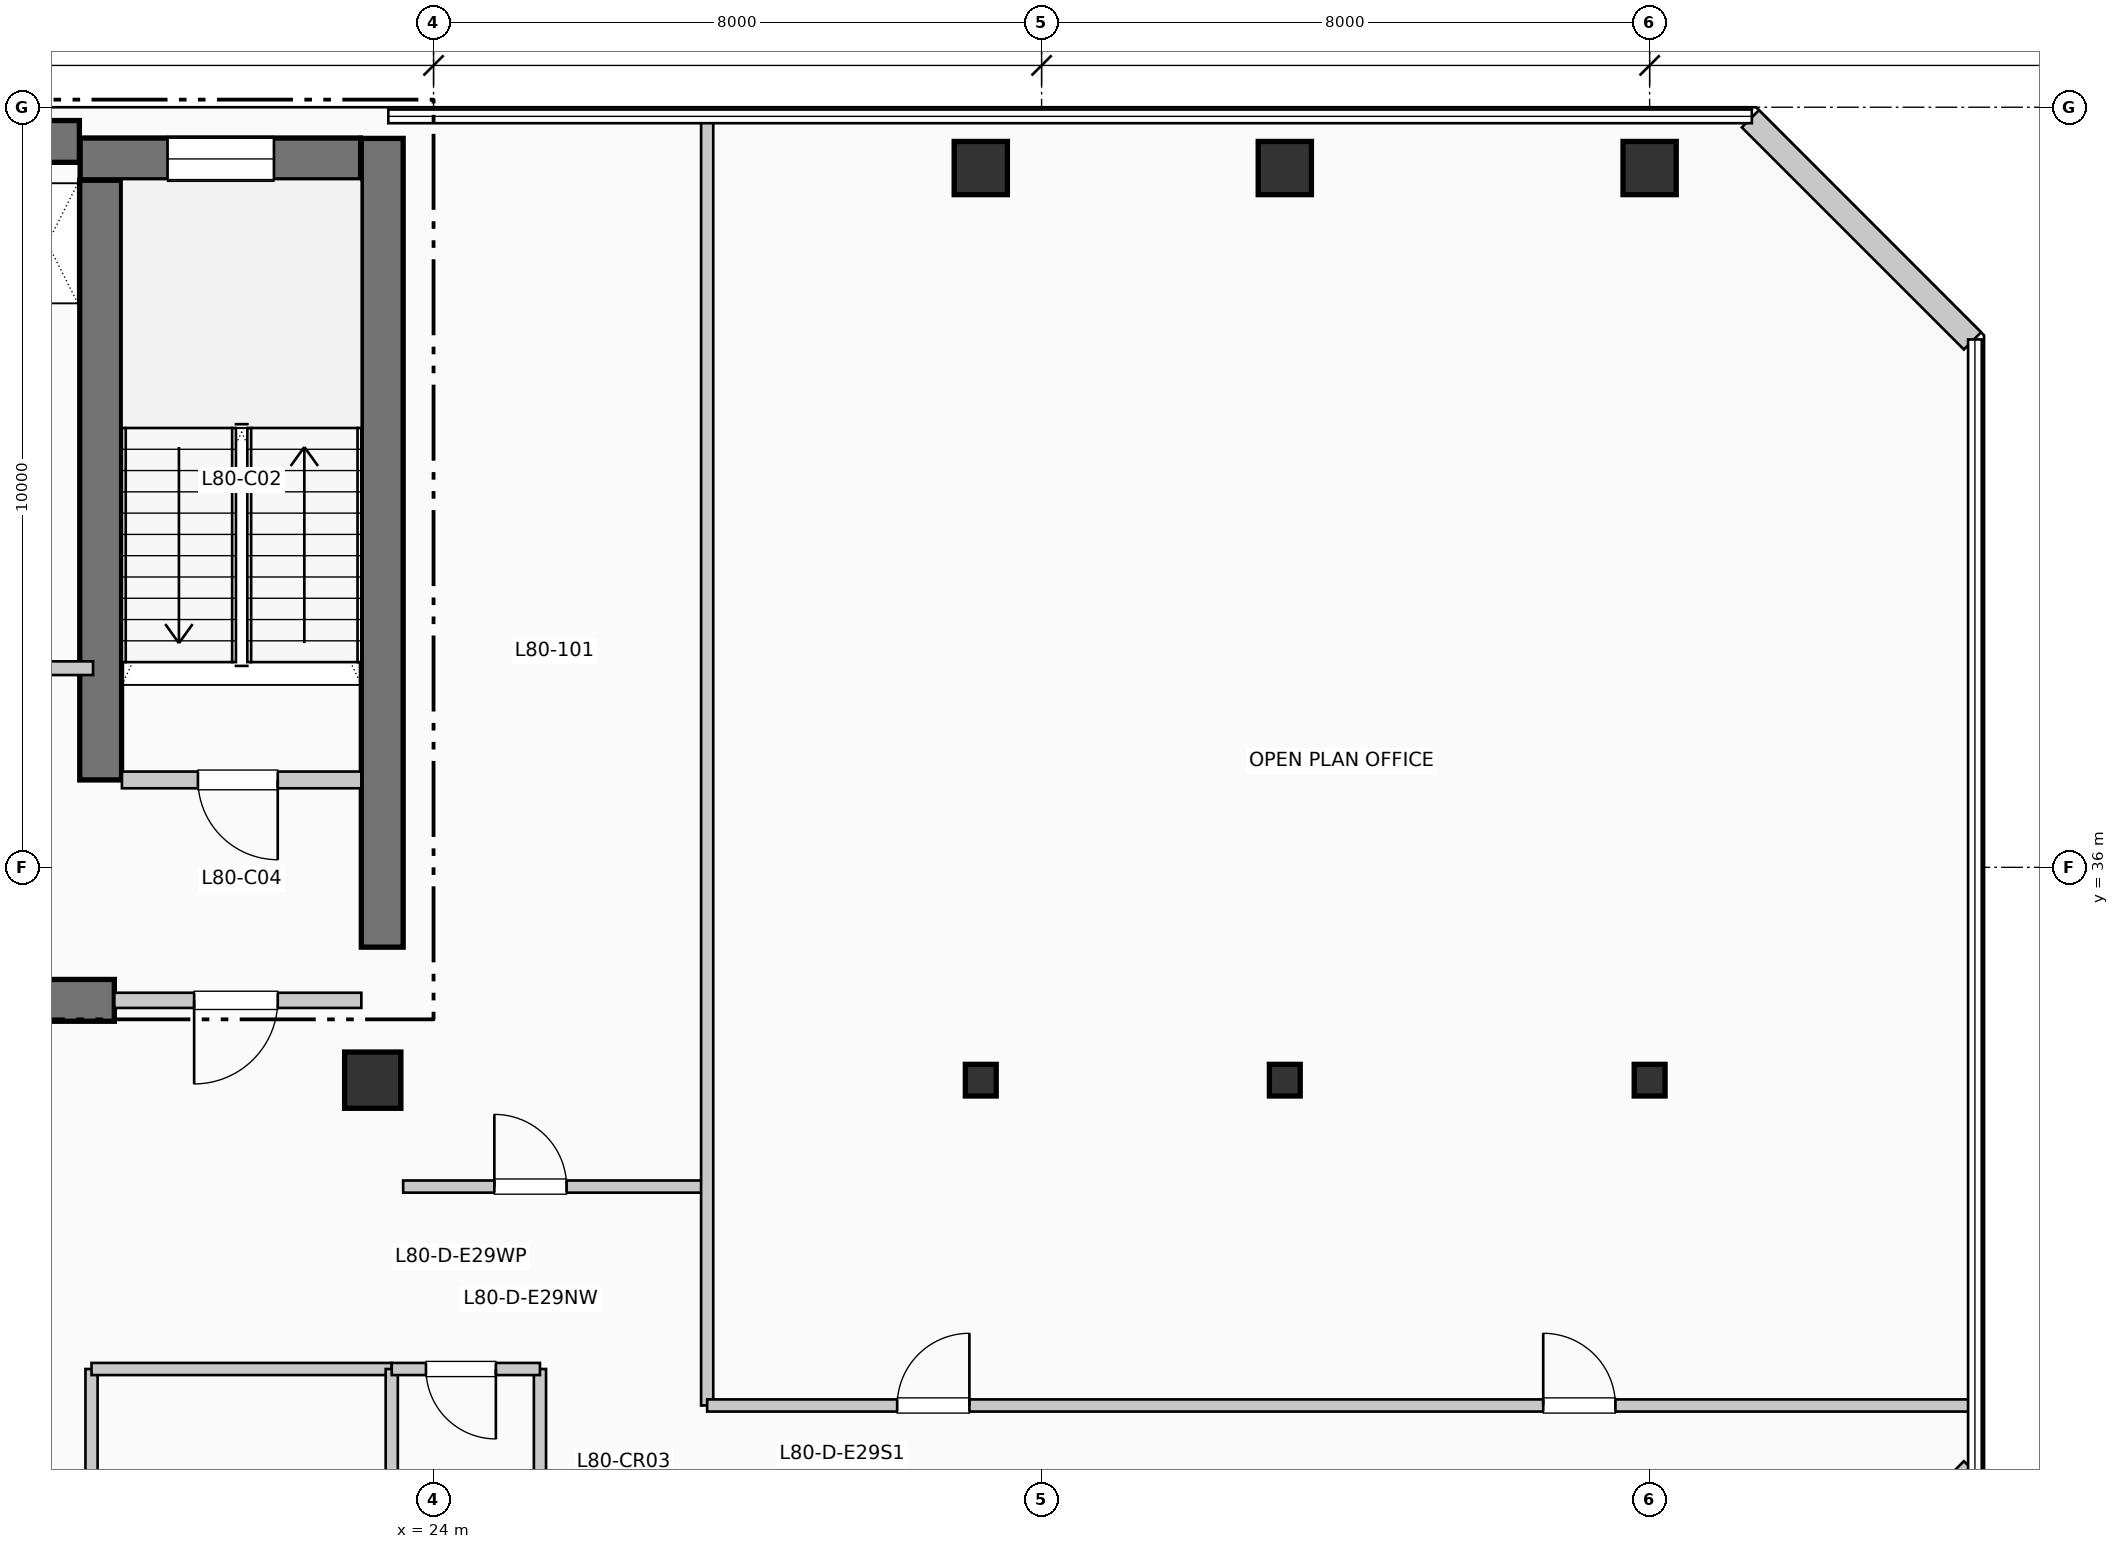
"""IFC4 building model, lengths in metres.
Left out: names, types, materials, properties, quantities, classifications, styles, units other than length and angle.
Written with IfcOpenShell. Run it as: python <this file> out.ifc"""

import sys

from ifc_helpers import new_model, si_unit, direction, frame, frame_2d, origin, origin_2d, place, context, subcontext, project, spatial, rectangle, i_section, extrude, element, fill, save


model = new_model("IFC4")
c1 = context("Model", 3, precision=1e-05, world=origin(), true_north=direction((0.0, 1.0)))
c2 = subcontext(c1, "Body", "Model", "MODEL_VIEW")
j1 = project(units=[si_unit("LENGTHUNIT", "METRE"), si_unit("PLANEANGLEUNIT", "RADIAN")], contexts=[c1])
p1 = place(None, origin())
s1 = spatial("IfcSite", under=j1, at=p1, CompositionType="ELEMENT")
p2 = place(p1, origin())
s2 = spatial("IfcBuilding", under=s1, at=p2, CompositionType="ELEMENT")
p3 = place(p2, frame((0.0, 0.0, 327.69)))
s3 = spatial("IfcBuildingStorey", under=s2, at=p3, CompositionType="ELEMENT", Elevation=327.69)
p4 = place(p3, frame((5.36, 45.55, 0.0), z_axis=(0.0, 0.0, 1.0), x_axis=(1.0, 0.0, 0.0)))
e1 = element("IfcWall", 1, at=p4, inside=s3, PredefinedType="SHEAR", context=c2, shape_type="SweptSolid", body=[
    extrude(rectangle(XDim=13.98, YDim=0.55, at=frame_2d((6.99, 0.0))), origin(), (0.0, 0.0, 1.0), 3.96),
])
p5 = place(p3, frame((23.325, 34.95, 0.0), z_axis=(0.0, 0.0, 1.0), x_axis=(0.0, 1.0, 0.0)))
e2 = element("IfcWall", 2, at=p5, inside=s3, PredefinedType="SHEAR", context=c2, shape_type="SweptSolid", body=[
    extrude(rectangle(XDim=10.64, YDim=0.55, at=frame_2d((5.32, 0.0))), origin(), (0.0, 0.0, 1.0), 3.96),
])
p6 = place(p3, frame((13.68, 34.25, 0.0), z_axis=(0.0, 0.0, 1.0), x_axis=(1.0, 0.0, 0.0)))
e3 = element("IfcWall", 3, at=p6, inside=s3, PredefinedType="SHEAR", context=c2, shape_type="SweptSolid", body=[
    extrude(rectangle(XDim=6.12, YDim=0.55, at=frame_2d((3.06, 0.0))), origin(), (0.0, 0.0, 1.0), 3.96),
])
p7 = place(p3, frame((19.62, 37.15, 0.0), z_axis=(0.0, 0.0, 1.0), x_axis=(0.0, 1.0, 0.0)))
e4 = element("IfcWall", 4, at=p7, inside=s3, PredefinedType="SHEAR", context=c2, shape_type="SweptSolid", body=[
    extrude(rectangle(XDim=7.89, YDim=0.55, at=frame_2d((3.945, 0.0))), origin(), (0.0, 0.0, 1.0), 3.96),
])
p8 = place(p3, frame((19.35, 45.32, 0.0), z_axis=(0.0, 0.0, 1.0), x_axis=(1.0, 0.0, 0.0)))
e5 = element("IfcWall", 5, at=p8, inside=s3, PredefinedType="SHEAR", context=c2, shape_type="SweptSolid", body=[
    extrude(rectangle(XDim=3.69, YDim=0.55, at=frame_2d((1.845, 0.0))), origin(), (0.0, 0.0, 1.0), 3.96),
])
p9 = place(p8, frame((1.15, 0.0, 1.05)))
e6 = element("IfcOpeningElement", 6, at=p9, cuts=e5, PredefinedType="OPENING", context=c2, shape_type="SweptSolid", body=[
    extrude(rectangle(XDim=1.4, YDim=1.8, at=frame_2d((0.7, 0.9))), frame((0.0, 0.285, 0.0), z_axis=(0.0, -1.0, 0.0), x_axis=(1.0, 0.0, 0.0)), (0.0, 0.0, 1.0), 0.57),
])
p10 = place(p3, frame((23.2, 33.2, 0.0), z_axis=(0.0, 0.0, 1.0), x_axis=(1.0, 0.0, 0.0)))
e7 = element("IfcColumn", 7, at=p10, inside=s3, PredefinedType="COLUMN", context=c2, shape_type="SweptSolid", body=[
    extrude(rectangle(XDim=0.74, YDim=0.74, at=origin_2d()), origin(), (0.0, 0.0, 1.0), 3.96),
])
p11 = place(p3, frame((31.2, 33.2, 0.0), z_axis=(0.0, 0.0, 1.0), x_axis=(1.0, 0.0, 0.0)))
e8 = element("IfcColumn", 8, at=p11, inside=s3, PredefinedType="COLUMN", context=c2, shape_type="SweptSolid", body=[
    extrude(i_section(OverallWidth=0.406, OverallDepth=0.416, WebThickness=0.022, FlangeThickness=0.036, at=origin_2d()), origin(), (0.0, 0.0, 1.0), 3.96),
])
p12 = place(p3, frame((31.2, 45.2, 0.0), z_axis=(0.0, 0.0, 1.0), x_axis=(1.0, 0.0, 0.0)))
e9 = element("IfcColumn", 9, at=p12, inside=s3, PredefinedType="COLUMN", context=c2, shape_type="SweptSolid", body=[
    extrude(rectangle(XDim=0.7, YDim=0.7, at=origin_2d()), origin(), (0.0, 0.0, 1.0), 3.96),
])
p13 = place(p3, frame((35.2, 33.2, 0.0), z_axis=(0.0, 0.0, 1.0), x_axis=(1.0, 0.0, 0.0)))
e10 = element("IfcColumn", 10, at=p13, inside=s3, PredefinedType="COLUMN", context=c2, shape_type="SweptSolid", body=[
    extrude(i_section(OverallWidth=0.406, OverallDepth=0.416, WebThickness=0.022, FlangeThickness=0.036, at=origin_2d()), origin(), (0.0, 0.0, 1.0), 3.96),
])
p14 = place(p3, frame((35.2, 45.2, 0.0), z_axis=(0.0, 0.0, 1.0), x_axis=(1.0, 0.0, 0.0)))
e11 = element("IfcColumn", 11, at=p14, inside=s3, PredefinedType="COLUMN", context=c2, shape_type="SweptSolid", body=[
    extrude(rectangle(XDim=0.7, YDim=0.7, at=origin_2d()), origin(), (0.0, 0.0, 1.0), 3.96),
])
p15 = place(p3, frame((40.0, 33.2, 0.0), z_axis=(0.0, 0.0, 1.0), x_axis=(1.0, 0.0, 0.0)))
e12 = element("IfcColumn", 12, at=p15, inside=s3, PredefinedType="COLUMN", context=c2, shape_type="SweptSolid", body=[
    extrude(i_section(OverallWidth=0.406, OverallDepth=0.416, WebThickness=0.022, FlangeThickness=0.036, at=origin_2d()), origin(), (0.0, 0.0, 1.0), 3.96),
])
p16 = place(p3, frame((40.0, 45.2, 0.0), z_axis=(0.0, 0.0, 1.0), x_axis=(1.0, 0.0, 0.0)))
e13 = element("IfcColumn", 13, at=p16, inside=s3, PredefinedType="COLUMN", context=c2, shape_type="SweptSolid", body=[
    extrude(rectangle(XDim=0.7, YDim=0.7, at=origin_2d()), origin(), (0.0, 0.0, 1.0), 3.96),
])
for number, where, z_axis, x_axis in (
    (14, (41.326, 25.152, 0.0), (0.0, 0.0, 1.0), (0.707, 0.707, 0.0)),
    (15, (44.248, 42.926, 0.0), (0.0, 0.0, 1.0), (-0.707, 0.707, 0.0)),
):
    element("IfcWall", number, at=place(p3, frame(where, z_axis=z_axis, x_axis=x_axis)), inside=s3, PredefinedType="SOLIDWALL", context=c2, shape_type="SweptSolid", body=[
        extrude(rectangle(XDim=4.133, YDim=0.32, at=frame_2d((2.066, 0.0))), origin(), (0.0, 0.0, 1.0), 3.74),
    ])
p17 = place(p3, frame((19.9, 37.15, 0.0), z_axis=(0.0, 0.0, 1.0), x_axis=(1.0, 0.0, 0.0)))
e16 = element("IfcWall", 16, at=p17, inside=s3, PredefinedType="PARTITIONING", context=c2, shape_type="SweptSolid", body=[
    extrude(rectangle(XDim=3.15, YDim=0.22, at=frame_2d((1.575, 0.0))), origin(), (0.0, 0.0, 1.0), 3.74),
])
p18 = place(p17, frame((2.05, 0.0, 0.0), z_axis=(0.0, 0.0, 1.0), x_axis=(-1.0, 0.0, 0.0)))
e17 = element("IfcOpeningElement", 17, at=p18, cuts=e16, PredefinedType="OPENING", context=c2, shape_type="SweptSolid", body=[
    extrude(rectangle(XDim=1.05, YDim=2.15, at=frame_2d((0.525, 1.075))), frame((0.0, 0.12, 0.0), z_axis=(0.0, -1.0, 0.0), x_axis=(1.0, 0.0, 0.0)), (0.0, 0.0, 1.0), 0.24),
])
p19 = place(p3, frame((19.8, 34.25, 0.0), z_axis=(0.0, 0.0, 1.0), x_axis=(1.0, 0.0, 0.0)))
e18 = element("IfcWall", 18, at=p19, inside=s3, PredefinedType="PARTITIONING", context=c2, shape_type="SweptSolid", body=[
    extrude(rectangle(XDim=3.25, YDim=0.2, at=frame_2d((1.625, 0.0))), origin(), (0.0, 0.0, 1.0), 3.74),
])
p20 = place(p19, frame((2.15, 0.0, 0.0), z_axis=(0.0, 0.0, 1.0), x_axis=(-1.0, 0.0, 0.0)))
e19 = element("IfcOpeningElement", 19, at=p20, cuts=e18, PredefinedType="OPENING", context=c2, shape_type="SweptSolid", body=[
    extrude(rectangle(XDim=1.1, YDim=2.15, at=frame_2d((0.55, 1.075))), frame((0.0, 0.11, 0.0), z_axis=(0.0, -1.0, 0.0), x_axis=(1.0, 0.0, 0.0)), (0.0, 0.0, 1.0), 0.22),
])
p21 = place(p3, frame((17.68, 38.62, 0.0), z_axis=(0.0, 0.0, 1.0), x_axis=(1.0, 0.0, 0.0)))
e20 = element("IfcWall", 20, at=p21, inside=s3, PredefinedType="PARTITIONING", context=c2, shape_type="SweptSolid", body=[
    extrude(rectangle(XDim=1.84, YDim=0.18, at=frame_2d((0.92, 0.0))), origin(), (0.0, 0.0, 1.0), 3.74),
])
p22 = place(p21, frame((0.24, 0.0, 0.0)))
e21 = element("IfcOpeningElement", 21, at=p22, cuts=e20, PredefinedType="OPENING", context=c2, shape_type="SweptSolid", body=[
    extrude(rectangle(XDim=0.92, YDim=2.1, at=frame_2d((0.46, 1.05))), frame((0.0, 0.1, 0.0), z_axis=(0.0, -1.0, 0.0), x_axis=(1.0, 0.0, 0.0)), (0.0, 0.0, 1.0), 0.2),
])
p23 = place(p3, frame((19.5, 21.0, 0.0), z_axis=(0.0, 0.0, 1.0), x_axis=(0.0, 1.0, 0.0)))
e22 = element("IfcWall", 22, at=p23, inside=s3, PredefinedType="PARTITIONING", context=c2, shape_type="SweptSolid", body=[
    extrude(rectangle(XDim=8.4, YDim=0.16, at=frame_2d((4.2, 0.0))), origin(), (0.0, 0.0, 1.0), 3.74),
])
p24 = place(p23, frame((3.725, 0.0, 0.0)))
e23 = element("IfcOpeningElement", 23, at=p24, cuts=e22, PredefinedType="OPENING", context=c2, shape_type="SweptSolid", body=[
    extrude(rectangle(XDim=0.95, YDim=2.15, at=frame_2d((0.475, 1.075))), frame((0.0, 0.09, 0.0), z_axis=(0.0, -1.0, 0.0), x_axis=(1.0, 0.0, 0.0)), (0.0, 0.0, 1.0), 0.18),
])
p25 = place(p3, frame((19.5, 29.4, 0.0), z_axis=(0.0, 0.0, 1.0), x_axis=(1.0, 0.0, 0.0)))
e24 = element("IfcWall", 24, at=p25, inside=s3, PredefinedType="PARTITIONING", context=c2, shape_type="SweptSolid", body=[
    extrude(rectangle(XDim=3.95, YDim=0.16, at=frame_2d((1.975, 0.0))), origin(), (0.0, 0.0, 1.0), 3.425),
])
p26 = place(p3, frame((23.45, 6.84, 0.0), z_axis=(0.0, 0.0, 1.0), x_axis=(0.0, 1.0, 0.0)))
e25 = element("IfcWall", 25, at=p26, inside=s3, PredefinedType="PARTITIONING", context=c2, shape_type="SweptSolid", body=[
    extrude(rectangle(XDim=22.56, YDim=0.16, at=frame_2d((11.28, 0.0))), origin(), (0.0, 0.0, 1.0), 3.175),
])
p27 = place(p3, frame((25.4, 25.19, 0.0), z_axis=(0.0, 0.0, 1.0), x_axis=(0.0, 1.0, 0.0)))
e26 = element("IfcWall", 26, at=p27, inside=s3, PredefinedType="PARTITIONING", context=c2, shape_type="SweptSolid", body=[
    extrude(rectangle(XDim=4.21, YDim=0.16, at=frame_2d((2.105, 0.0))), origin(), (0.0, 0.0, 1.0), 3.74),
])
p28 = place(p3, frame((23.6, 31.8, 0.0), z_axis=(0.0, 0.0, 1.0), x_axis=(1.0, 0.0, 0.0)))
e27 = element("IfcWall", 27, at=p28, inside=s3, PredefinedType="PARTITIONING", context=c2, shape_type="SweptSolid", body=[
    extrude(rectangle(XDim=4.0, YDim=0.16, at=frame_2d((2.0, 0.0))), origin(), (0.0, 0.0, 1.0), 3.74),
])
p29 = place(p28, frame((1.2, 0.0, 0.0)))
e28 = element("IfcOpeningElement", 28, at=p29, cuts=e27, PredefinedType="OPENING", context=c2, shape_type="SweptSolid", body=[
    extrude(rectangle(XDim=0.95, YDim=2.15, at=frame_2d((0.475, 1.075))), frame((0.0, 0.09, 0.0), z_axis=(0.0, -1.0, 0.0), x_axis=(1.0, 0.0, 0.0)), (0.0, 0.0, 1.0), 0.18),
])
p30 = place(p3, frame((27.6, 28.92, 0.0), z_axis=(0.0, 0.0, 1.0), x_axis=(0.0, 1.0, 0.0)))
e29 = element("IfcWall", 29, at=p30, inside=s3, PredefinedType="PARTITIONING", context=c2, shape_type="SweptSolid", body=[
    extrude(rectangle(XDim=16.89, YDim=0.16, at=frame_2d((8.445, 0.0))), origin(), (0.0, 0.0, 1.0), 3.74),
])
p31 = place(p3, frame((27.6, 28.92, 0.0), z_axis=(0.0, 0.0, 1.0), x_axis=(1.0, 0.0, 0.0)))
e30 = element("IfcWall", 30, at=p31, inside=s3, PredefinedType="PARTITIONING", context=c2, shape_type="SweptSolid", body=[
    extrude(rectangle(XDim=16.61, YDim=0.16, at=frame_2d((8.305, 0.0))), origin(), (0.0, 0.0, 1.0), 3.74),
])
p32 = place(p31, frame((2.5, 0.0, 0.0)))
e31 = element("IfcOpeningElement", 31, at=p32, cuts=e30, PredefinedType="OPENING", context=c2, shape_type="SweptSolid", body=[
    extrude(rectangle(XDim=0.95, YDim=2.15, at=frame_2d((0.475, 1.075))), frame((0.0, 0.09, 0.0), z_axis=(0.0, -1.0, 0.0), x_axis=(1.0, 0.0, 0.0)), (0.0, 0.0, 1.0), 0.18),
])
p33 = place(p31, frame((11.0, 0.0, 0.0)))
e32 = element("IfcOpeningElement", 32, at=p33, cuts=e30, PredefinedType="OPENING", context=c2, shape_type="SweptSolid", body=[
    extrude(rectangle(XDim=0.95, YDim=2.15, at=frame_2d((0.475, 1.075))), frame((0.0, 0.09, 0.0), z_axis=(0.0, -1.0, 0.0), x_axis=(1.0, 0.0, 0.0)), (0.0, 0.0, 1.0), 0.18),
])
p34 = place(p3, frame((23.45, 29.4, 0.0), z_axis=(0.0, 0.0, 1.0), x_axis=(1.0, 0.0, 0.0)))
e33 = element("IfcWall", 33, at=p34, inside=s3, PredefinedType="PARTITIONING", context=c2, shape_type="SweptSolid", body=[
    extrude(rectangle(XDim=1.95, YDim=0.16, at=frame_2d((0.975, 0.0))), origin(), (0.0, 0.0, 1.0), 3.425),
])
p35 = place(p34, frame((1.37, 0.0, 0.0), z_axis=(0.0, 0.0, 1.0), x_axis=(-1.0, 0.0, 0.0)))
e34 = element("IfcOpeningElement", 34, at=p35, cuts=e33, PredefinedType="OPENING", context=c2, shape_type="SweptSolid", body=[
    extrude(rectangle(XDim=0.92, YDim=2.1, at=frame_2d((0.46, 1.05))), frame((0.0, 0.09, 0.0), z_axis=(0.0, -1.0, 0.0), x_axis=(1.0, 0.0, 0.0)), (0.0, 0.0, 1.0), 0.18),
])
p36 = place(p9, origin())
e35 = element("IfcWindow", 35, at=p36, inside=s3, PartitioningType="SINGLE_PANEL", PredefinedType="WINDOW", context=c2, shape_type="SweptSolid", body=[
    extrude(rectangle(XDim=1.4, YDim=1.8, at=frame_2d((0.7, 0.9))), frame((0.0, 0.03, 0.0), z_axis=(0.0, -1.0, 0.0), x_axis=(1.0, 0.0, 0.0)), (0.0, 0.0, 1.0), 0.06),
])
fill(e6, e35)
p37 = place(p18, origin())
e36 = element("IfcDoor", 36, at=p37, inside=s3, OperationType="SINGLE_SWING_RIGHT", PredefinedType="DOOR", context=c2, shape_type="SweptSolid", body=[
    extrude(rectangle(XDim=1.05, YDim=2.15, at=frame_2d((0.525, 1.075))), frame((0.0, 0.025, 0.0), z_axis=(0.0, -1.0, 0.0), x_axis=(1.0, 0.0, 0.0)), (0.0, 0.0, 1.0), 0.05),
])
fill(e17, e36)
p38 = place(p20, origin())
e37 = element("IfcDoor", 37, at=p38, inside=s3, OperationType="SINGLE_SWING_LEFT", PredefinedType="DOOR", context=c2, shape_type="SweptSolid", body=[
    extrude(rectangle(XDim=1.1, YDim=2.15, at=frame_2d((0.55, 1.075))), frame((0.0, 0.025, 0.0), z_axis=(0.0, -1.0, 0.0), x_axis=(1.0, 0.0, 0.0)), (0.0, 0.0, 1.0), 0.05),
])
fill(e19, e37)
p39 = place(p29, origin())
e38 = element("IfcDoor", 38, at=p39, inside=s3, OperationType="SINGLE_SWING_LEFT", PredefinedType="DOOR", context=c2, shape_type="SweptSolid", body=[
    extrude(rectangle(XDim=0.95, YDim=2.15, at=frame_2d((0.475, 1.075))), frame((0.0, 0.025, 0.0), z_axis=(0.0, -1.0, 0.0), x_axis=(1.0, 0.0, 0.0)), (0.0, 0.0, 1.0), 0.05),
])
fill(e28, e38)
p40 = place(p32, origin())
e39 = element("IfcDoor", 39, at=p40, inside=s3, OperationType="SINGLE_SWING_RIGHT", PredefinedType="DOOR", context=c2, shape_type="SweptSolid", body=[
    extrude(rectangle(XDim=0.95, YDim=2.15, at=frame_2d((0.475, 1.075))), frame((0.0, 0.025, 0.0), z_axis=(0.0, -1.0, 0.0), x_axis=(1.0, 0.0, 0.0)), (0.0, 0.0, 1.0), 0.05),
])
fill(e31, e39)
p41 = place(p33, origin())
e40 = element("IfcDoor", 40, at=p41, inside=s3, OperationType="SINGLE_SWING_LEFT", PredefinedType="DOOR", context=c2, shape_type="SweptSolid", body=[
    extrude(rectangle(XDim=0.95, YDim=2.15, at=frame_2d((0.475, 1.075))), frame((0.0, 0.025, 0.0), z_axis=(0.0, -1.0, 0.0), x_axis=(1.0, 0.0, 0.0)), (0.0, 0.0, 1.0), 0.05),
])
fill(e32, e40)
p42 = place(p35, origin())
e41 = element("IfcDoor", 41, at=p42, inside=s3, OperationType="SINGLE_SWING_RIGHT", PredefinedType="DOOR", context=c2, shape_type="SweptSolid", body=[
    extrude(rectangle(XDim=0.92, YDim=2.1, at=frame_2d((0.46, 1.05))), frame((0.0, 0.025, 0.0), z_axis=(0.0, -1.0, 0.0), x_axis=(1.0, 0.0, 0.0)), (0.0, 0.0, 1.0), 0.05),
])
fill(e34, e41)
save(model, sys.argv[1])
